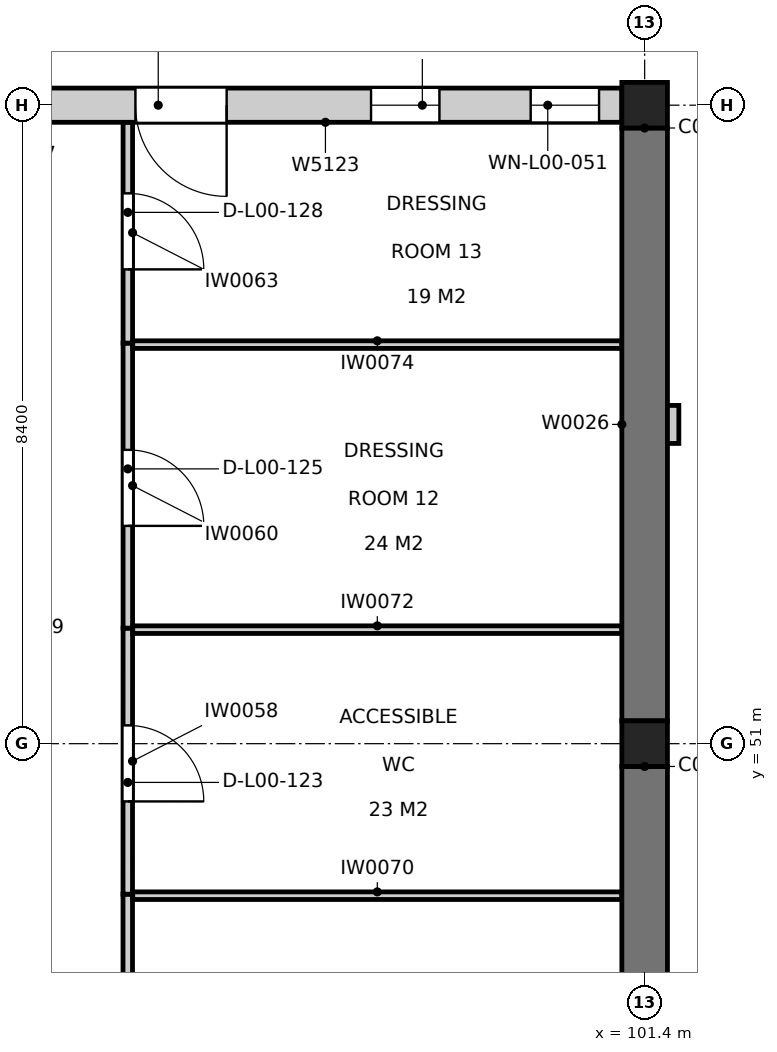
"""IFC4 building model, lengths in metres.
Left out: names, types, materials, properties, quantities, classifications, styles, units other than length and angle.
Written with IfcOpenShell. Run it as: python <this file> out.ifc"""

import sys

from ifc_helpers import new_model, si_unit, direction, frame, frame_2d, origin, origin_2d, place, context, subcontext, project, spatial, rectangle, extrude, element, fill, save


model = new_model("IFC4")
c1 = context("Model", 3, precision=1e-05, world=origin(), true_north=direction((0.0, 1.0)))
c2 = subcontext(c1, "Body", "Model", "MODEL_VIEW")
j1 = project(units=[si_unit("LENGTHUNIT", "METRE"), si_unit("PLANEANGLEUNIT", "RADIAN")], contexts=[c1])
p1 = place(None, origin())
s1 = spatial("IfcSite", under=j1, at=p1, CompositionType="ELEMENT")
p2 = place(p1, origin())
s2 = spatial("IfcBuilding", under=s1, at=p2, CompositionType="ELEMENT")
p3 = place(p2, origin())
s3 = spatial("IfcBuildingStorey", under=s2, at=p3, CompositionType="ELEMENT", Elevation=0.0)
for number, where, z_axis, x_axis in (
    (1, (101.4, 51.0, 0.0), (0.0, 0.0, 1.0), (1.0, 0.0, 0.0)),
    (2, (101.4, 59.4, 0.0), (0.0, 0.0, 1.0), (1.0, 0.0, 0.0)),
):
    element("IfcColumn", number, at=place(p3, frame(where, z_axis=z_axis, x_axis=x_axis)), inside=s3, PredefinedType="COLUMN", context=c2, shape_type="SweptSolid", body=[
        extrude(rectangle(XDim=0.6, YDim=0.6, at=origin_2d()), origin(), (0.0, 0.0, 1.0), 4.8),
    ])
for number, where, z_axis, x_axis in (
    (3, (101.4, 42.9, 0.0), (0.0, 0.0, 1.0), (0.0, 1.0, 0.0)),
    (4, (101.4, 51.3, 0.0), (0.0, 0.0, 1.0), (0.0, 1.0, 0.0)),
):
    element("IfcWall", number, at=place(p3, frame(where, z_axis=z_axis, x_axis=x_axis)), inside=s3, PredefinedType="SOLIDWALL", context=c2, shape_type="SweptSolid", body=[
        extrude(rectangle(XDim=7.8, YDim=0.6, at=frame_2d((3.9, 0.0))), origin(), (0.0, 0.0, 1.0), 4.8),
    ])
p4 = place(p3, frame((94.599, 49.02, 0.0), z_axis=(0.0, 0.0, 1.0), x_axis=(0.0, -1.0, 0.0)))
e5 = element("IfcWall", 5, at=p4, inside=s3, PredefinedType="PARTITIONING", context=c2, shape_type="SweptSolid", body=[
    extrude(rectangle(XDim=6.424, YDim=0.125, at=frame_2d((3.212, 0.0))), origin(), (0.0, 0.0, 1.0), 3.84),
])
p5 = place(p4, frame((3.229, 0.0, 0.0)))
e6 = element("IfcOpeningElement", 6, at=p5, cuts=e5, PredefinedType="OPENING", context=c2, shape_type="SweptSolid", body=[
    extrude(rectangle(XDim=1.0, YDim=2.1, at=frame_2d((0.5, 1.05))), frame((0.0, 0.073, 0.0), z_axis=(0.0, -1.0, 0.0), x_axis=(1.0, 0.0, 0.0)), (0.0, 0.0, 1.0), 0.145),
])
p6 = place(p3, frame((94.6, 52.52, 0.0), z_axis=(0.0, 0.0, 1.0), x_axis=(-0.000279017846, -0.999999961075, 0.0)))
e7 = element("IfcWall", 7, at=p6, inside=s3, PredefinedType="PARTITIONING", context=c2, shape_type="SweptSolid", body=[
    extrude(rectangle(XDim=3.5, YDim=0.125, at=frame_2d((1.75, 0.0))), origin(), (0.0, 0.0, 1.0), 3.84),
])
p7 = place(p6, frame((1.28, 0.0, 0.0)))
e8 = element("IfcOpeningElement", 8, at=p7, cuts=e7, PredefinedType="OPENING", context=c2, shape_type="SweptSolid", body=[
    extrude(rectangle(XDim=1.0, YDim=2.1, at=frame_2d((0.5, 1.05))), frame((0.0, 0.073, 0.0), z_axis=(0.0, -1.0, 0.0), x_axis=(1.0, 0.0, 0.0)), (0.0, 0.0, 1.0), 0.145),
])
p8 = place(p3, frame((94.6, 56.27, 0.0), z_axis=(0.0, 0.0, 1.0), x_axis=(0.0, -1.0, 0.0)))
e9 = element("IfcWall", 9, at=p8, inside=s3, PredefinedType="PARTITIONING", context=c2, shape_type="SweptSolid", body=[
    extrude(rectangle(XDim=3.75, YDim=0.125, at=frame_2d((1.875, 0.0))), origin(), (0.0, 0.0, 1.0), 3.94),
])
p9 = place(p8, frame((1.405, 0.0, 0.0)))
e10 = element("IfcOpeningElement", 10, at=p9, cuts=e9, PredefinedType="OPENING", context=c2, shape_type="SweptSolid", body=[
    extrude(rectangle(XDim=1.0, YDim=2.1, at=frame_2d((0.5, 1.05))), frame((0.0, 0.073, 0.0), z_axis=(0.0, -1.0, 0.0), x_axis=(1.0, 0.0, 0.0)), (0.0, 0.0, 1.0), 0.145),
])
p10 = place(p3, frame((94.6, 59.175, 0.0), z_axis=(0.0, 0.0, 1.0), x_axis=(0.0, -1.0, 0.0)))
e11 = element("IfcWall", 11, at=p10, inside=s3, PredefinedType="PARTITIONING", context=c2, shape_type="SweptSolid", body=[
    extrude(rectangle(XDim=2.905, YDim=0.125, at=frame_2d((1.452, 0.0))), origin(), (0.0, 0.0, 1.0), 3.94),
])
p11 = place(p10, frame((0.935, 0.0, 0.0)))
e12 = element("IfcOpeningElement", 12, at=p11, cuts=e11, PredefinedType="OPENING", context=c2, shape_type="SweptSolid", body=[
    extrude(rectangle(XDim=1.0, YDim=2.1, at=frame_2d((0.5, 1.05))), frame((0.0, 0.073, 0.0), z_axis=(0.0, -1.0, 0.0), x_axis=(1.0, 0.0, 0.0)), (0.0, 0.0, 1.0), 0.145),
])
for number, where, z_axis, x_axis in (
    (13, (94.665, 49.0, 0.0), (0.0, 0.0, 1.0), (1.0, 0.0, 0.0)),
    (14, (94.665, 52.5, 0.0), (0.0, 0.0, 1.0), (1.0, 0.0, 0.0)),
    (15, (94.665, 56.25, 0.0), (0.0, 0.0, 1.0), (1.0, 0.0, 0.0)),
):
    element("IfcWall", number, at=place(p3, frame(where, z_axis=z_axis, x_axis=x_axis)), inside=s3, PredefinedType="PARTITIONING", context=c2, shape_type="SweptSolid", body=[
        extrude(rectangle(XDim=6.435, YDim=0.1, at=frame_2d((3.218, 0.0))), origin(), (0.0, 0.0, 1.0), 4.64),
    ])
p12 = place(p3, frame((101.1, 59.4, 0.0), z_axis=(0.0, 0.0, 1.0), x_axis=(-1.0, 0.0, 0.0)))
e16 = element("IfcWall", 16, at=p12, inside=s3, PredefinedType="SOLIDWALL", context=c2, shape_type="SweptSolid", body=[
    extrude(rectangle(XDim=7.8, YDim=0.45, at=frame_2d((3.9, 0.0))), origin(), (0.0, 0.0, 1.0), 3.84),
])
p13 = place(p12, frame((5.2, 0.0, 0.0)))
e17 = element("IfcOpeningElement", 17, at=p13, cuts=e16, PredefinedType="OPENING", context=c2, shape_type="SweptSolid", body=[
    extrude(rectangle(XDim=1.2, YDim=2.4, at=frame_2d((0.6, 1.2))), frame((0.0, 0.235, 0.0), z_axis=(0.0, -1.0, 0.0), x_axis=(1.0, 0.0, 0.0)), (0.0, 0.0, 1.0), 0.47),
])
p14 = place(p12, frame((2.4, 0.0, 1.8)))
e18 = element("IfcOpeningElement", 18, at=p14, cuts=e16, PredefinedType="OPENING", context=c2, shape_type="SweptSolid", body=[
    extrude(rectangle(XDim=0.9, YDim=0.6, at=frame_2d((0.45, 0.3))), frame((0.0, 0.235, 0.0), z_axis=(0.0, -1.0, 0.0), x_axis=(1.0, 0.0, 0.0)), (0.0, 0.0, 1.0), 0.47),
])
p15 = place(p12, frame((0.3, 0.0, 1.8)))
e19 = element("IfcOpeningElement", 19, at=p15, cuts=e16, PredefinedType="OPENING", context=c2, shape_type="SweptSolid", body=[
    extrude(rectangle(XDim=0.9, YDim=0.6, at=frame_2d((0.45, 0.3))), frame((0.0, 0.235, 0.0), z_axis=(0.0, -1.0, 0.0), x_axis=(1.0, 0.0, 0.0)), (0.0, 0.0, 1.0), 0.47),
])
p16 = place(p3, frame((101.775, 54.95, 0.0), z_axis=(0.0, 0.0, 1.0), x_axis=(0.0, 1.0, 0.0)))
e20 = element("IfcWall", 20, at=p16, inside=s3, PredefinedType="SOLIDWALL", context=c2, shape_type="SweptSolid", body=[
    extrude(rectangle(XDim=0.5, YDim=0.15, at=frame_2d((0.25, 0.0))), origin(), (0.0, 0.0, 1.0), 4.8),
])
p17 = place(p7, origin())
e21 = element("IfcDoor", 21, at=p17, inside=s3, OperationType="SINGLE_SWING_RIGHT", PredefinedType="DOOR", context=c2, shape_type="SweptSolid", body=[
    extrude(rectangle(XDim=1.0, YDim=2.1, at=frame_2d((0.5, 1.05))), frame((0.0, 0.025, 0.0), z_axis=(0.0, -1.0, 0.0), x_axis=(1.0, 0.0, 0.0)), (0.0, 0.0, 1.0), 0.05),
])
fill(e8, e21)
p18 = place(p9, origin())
e22 = element("IfcDoor", 22, at=p18, inside=s3, OperationType="SINGLE_SWING_RIGHT", PredefinedType="DOOR", context=c2, shape_type="SweptSolid", body=[
    extrude(rectangle(XDim=1.0, YDim=2.1, at=frame_2d((0.5, 1.05))), frame((0.0, 0.025, 0.0), z_axis=(0.0, -1.0, 0.0), x_axis=(1.0, 0.0, 0.0)), (0.0, 0.0, 1.0), 0.05),
])
fill(e10, e22)
p19 = place(p11, origin())
e23 = element("IfcDoor", 23, at=p19, inside=s3, OperationType="SINGLE_SWING_RIGHT", PredefinedType="DOOR", context=c2, shape_type="SweptSolid", body=[
    extrude(rectangle(XDim=1.0, YDim=2.1, at=frame_2d((0.5, 1.05))), frame((0.0, 0.025, 0.0), z_axis=(0.0, -1.0, 0.0), x_axis=(1.0, 0.0, 0.0)), (0.0, 0.0, 1.0), 0.05),
])
fill(e12, e23)
p20 = place(p13, origin())
e24 = element("IfcDoor", 24, at=p20, inside=s3, OperationType="SINGLE_SWING_LEFT", PredefinedType="DOOR", context=c2, shape_type="SweptSolid", body=[
    extrude(rectangle(XDim=1.2, YDim=2.4, at=frame_2d((0.6, 1.2))), frame((0.0, 0.025, 0.0), z_axis=(0.0, -1.0, 0.0), x_axis=(1.0, 0.0, 0.0)), (0.0, 0.0, 1.0), 0.05),
])
fill(e17, e24)
p21 = place(p14, origin())
e25 = element("IfcWindow", 25, at=p21, inside=s3, PartitioningType="SINGLE_PANEL", PredefinedType="WINDOW", context=c2, shape_type="SweptSolid", body=[
    extrude(rectangle(XDim=0.9, YDim=0.6, at=frame_2d((0.45, 0.3))), frame((0.0, 0.035, 0.0), z_axis=(0.0, -1.0, 0.0), x_axis=(1.0, 0.0, 0.0)), (0.0, 0.0, 1.0), 0.06),
])
fill(e18, e25)
p22 = place(p15, origin())
e26 = element("IfcWindow", 26, at=p22, inside=s3, PartitioningType="SINGLE_PANEL", PredefinedType="WINDOW", context=c2, shape_type="SweptSolid", body=[
    extrude(rectangle(XDim=0.9, YDim=0.6, at=frame_2d((0.45, 0.3))), frame((0.0, 0.035, 0.0), z_axis=(0.0, -1.0, 0.0), x_axis=(1.0, 0.0, 0.0)), (0.0, 0.0, 1.0), 0.06),
])
fill(e19, e26)
save(model, sys.argv[1])
